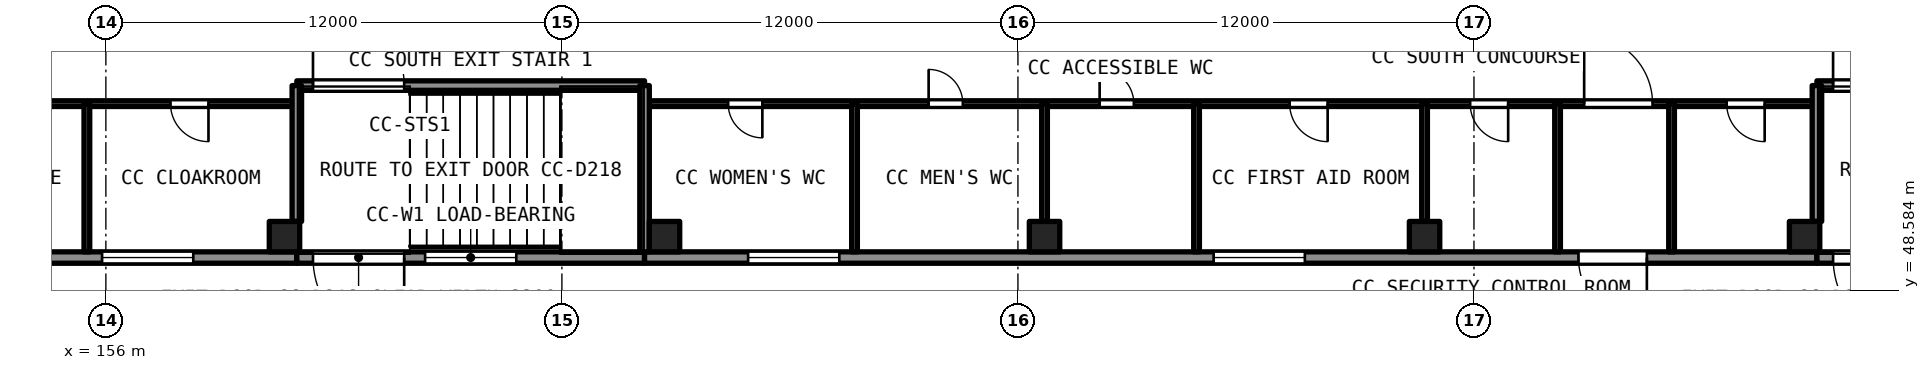
"""IFC4 building model, lengths in metres.
Left out: names, types, materials, properties, quantities, classifications, styles, units other than length and angle.
Written with IfcOpenShell. Run it as: python <this file> out.ifc"""

import sys

from ifc_helpers import new_model, si_unit, direction, frame, frame_2d, origin, origin_2d, place, context, subcontext, project, spatial, rectangle, extrude, element, fill, save


model = new_model("IFC4")
c1 = context("Model", 3, precision=1e-05, world=origin(), true_north=direction((0.0, 1.0)))
c2 = subcontext(c1, "Body", "Model", "MODEL_VIEW")
j1 = project(units=[si_unit("LENGTHUNIT", "METRE"), si_unit("PLANEANGLEUNIT", "RADIAN")], contexts=[c1])
p1 = place(None, origin())
s1 = spatial("IfcSite", under=j1, at=p1, CompositionType="ELEMENT")
p2 = place(p1, origin())
s2 = spatial("IfcBuilding", under=s1, at=p2, CompositionType="ELEMENT")
p3 = place(p2, origin())
s3 = spatial("IfcBuildingStorey", under=s2, at=p3, CompositionType="ELEMENT", Elevation=0.0)
for number, where, z_axis, x_axis in (
    (1, (160.7, 50.0, -1.2), (0.0, 0.0, 1.0), (1.0, 0.0, 0.0)),
    (2, (170.7, 50.0, -1.2), (0.0, 0.0, 1.0), (1.0, 0.0, 0.0)),
    (3, (180.7, 50.0, -1.2), (0.0, 0.0, 1.0), (1.0, 0.0, 0.0)),
    (4, (190.7, 50.0, -1.2), (0.0, 0.0, 1.0), (1.0, 0.0, 0.0)),
    (5, (200.7, 50.0, -1.2), (0.0, 0.0, 1.0), (1.0, 0.0, 0.0)),
):
    element("IfcColumn", number, at=place(p3, frame(where, z_axis=z_axis, x_axis=x_axis)), inside=s3, PredefinedType="COLUMN", context=c2, shape_type="SweptSolid", body=[
        extrude(rectangle(XDim=0.8, YDim=0.8, at=origin_2d()), origin(), (0.0, 0.0, 1.0), 10.2),
    ])
p4 = place(p3, frame((150.15, 49.45, 0.0), z_axis=(0.0, 0.0, 1.0), x_axis=(1.0, 0.0, 0.0)))
e6 = element("IfcWall", 6, at=p4, inside=s3, PredefinedType="SOLIDWALL", context=c2, shape_type="SweptSolid", body=[
    extrude(rectangle(XDim=10.875, YDim=0.3, at=frame_2d((5.438, 0.0))), origin(), (0.0, 0.0, 1.0), 8.59),
])
p5 = place(p4, frame((5.75, 0.0, 0.9)))
e7 = element("IfcOpeningElement", 7, at=p5, cuts=e6, PredefinedType="OPENING", context=c2, shape_type="SweptSolid", body=[
    extrude(rectangle(XDim=2.4, YDim=1.8, at=frame_2d((1.2, 0.9))), frame((0.0, 0.161, 0.0), z_axis=(0.0, -1.0, 0.0), x_axis=(1.0, 0.0, 0.0)), (0.0, 0.0, 1.0), 0.321),
])
p6 = place(p3, frame((170.175, 49.45, 0.0), z_axis=(0.0, 0.0, 1.0), x_axis=(-1.0, 0.0, 0.0)))
e8 = element("IfcWall", 8, at=p6, inside=s3, PredefinedType="SOLIDWALL", context=c2, shape_type="SweptSolid", body=[
    extrude(rectangle(XDim=9.15, YDim=0.3, at=frame_2d((4.575, 0.0))), origin(), (0.0, 0.0, 1.0), 8.59),
])
p7 = place(p6, frame((6.325, 0.0, 0.0)))
e9 = element("IfcOpeningElement", 9, at=p7, cuts=e8, PredefinedType="OPENING", context=c2, shape_type="SweptSolid", body=[
    extrude(rectangle(XDim=2.4, YDim=2.1, at=frame_2d((1.2, 1.05))), frame((0.0, 0.161, 0.0), z_axis=(0.0, -1.0, 0.0), x_axis=(1.0, 0.0, 0.0)), (0.0, 0.0, 1.0), 0.321),
])
p8 = place(p6, frame((3.375, 0.0, 0.9)))
e10 = element("IfcOpeningElement", 10, at=p8, cuts=e8, PredefinedType="OPENING", context=c2, shape_type="SweptSolid", body=[
    extrude(rectangle(XDim=2.4, YDim=1.8, at=frame_2d((1.2, 0.9))), frame((0.0, 0.161, 0.0), z_axis=(0.0, -1.0, 0.0), x_axis=(1.0, 0.0, 0.0)), (0.0, 0.0, 1.0), 0.321),
])
p9 = place(p3, frame((201.025, 49.45, 0.0), z_axis=(0.0, 0.0, 1.0), x_axis=(-1.0, 0.0, 0.0)))
e11 = element("IfcWall", 11, at=p9, inside=s3, PredefinedType="SOLIDWALL", context=c2, shape_type="SweptSolid", body=[
    extrude(rectangle(XDim=30.85, YDim=0.3, at=frame_2d((15.425, 0.0))), origin(), (0.0, 0.0, 1.0), 8.59),
])
p10 = place(p9, frame((4.475, 0.0, 0.0)))
e12 = element("IfcOpeningElement", 12, at=p10, cuts=e11, PredefinedType="OPENING", context=c2, shape_type="SweptSolid", body=[
    extrude(rectangle(XDim=1.8, YDim=2.1, at=frame_2d((0.9, 1.05))), frame((0.0, 0.161, 0.0), z_axis=(0.0, -1.0, 0.0), x_axis=(1.0, 0.0, 0.0)), (0.0, 0.0, 1.0), 0.321),
])
p11 = place(p9, frame((25.725, 0.0, 0.9)))
e13 = element("IfcOpeningElement", 13, at=p11, cuts=e11, PredefinedType="OPENING", context=c2, shape_type="SweptSolid", body=[
    extrude(rectangle(XDim=2.4, YDim=1.8, at=frame_2d((1.2, 0.9))), frame((0.0, 0.161, 0.0), z_axis=(0.0, -1.0, 0.0), x_axis=(1.0, 0.0, 0.0)), (0.0, 0.0, 1.0), 0.321),
])
p12 = place(p9, frame((13.475, 0.0, 0.9)))
e14 = element("IfcOpeningElement", 14, at=p12, cuts=e11, PredefinedType="OPENING", context=c2, shape_type="SweptSolid", body=[
    extrude(rectangle(XDim=2.4, YDim=1.8, at=frame_2d((1.2, 0.9))), frame((0.0, 0.161, 0.0), z_axis=(0.0, -1.0, 0.0), x_axis=(1.0, 0.0, 0.0)), (0.0, 0.0, 1.0), 0.321),
])
p13 = place(p3, frame((210.175, 49.45, 0.0), z_axis=(0.0, 0.0, 1.0), x_axis=(-1.0, 0.0, 0.0)))
e15 = element("IfcWall", 15, at=p13, inside=s3, PredefinedType="SOLIDWALL", context=c2, shape_type="SweptSolid", body=[
    extrude(rectangle(XDim=9.15, YDim=0.3, at=frame_2d((4.575, 0.0))), origin(), (0.0, 0.0, 1.0), 8.59),
])
p14 = place(p13, frame((6.325, 0.0, 0.0)))
e16 = element("IfcOpeningElement", 16, at=p14, cuts=e15, PredefinedType="OPENING", context=c2, shape_type="SweptSolid", body=[
    extrude(rectangle(XDim=2.4, YDim=2.1, at=frame_2d((1.2, 1.05))), frame((0.0, 0.161, 0.0), z_axis=(0.0, -1.0, 0.0), x_axis=(1.0, 0.0, 0.0)), (0.0, 0.0, 1.0), 0.321),
])
p15 = place(p13, frame((3.375, 0.0, 0.9)))
e17 = element("IfcOpeningElement", 17, at=p15, cuts=e15, PredefinedType="OPENING", context=c2, shape_type="SweptSolid", body=[
    extrude(rectangle(XDim=2.4, YDim=1.8, at=frame_2d((1.2, 0.9))), frame((0.0, 0.161, 0.0), z_axis=(0.0, -1.0, 0.0), x_axis=(1.0, 0.0, 0.0)), (0.0, 0.0, 1.0), 0.321),
])
p16 = place(p3, frame((150.3, 53.5, 0.0), z_axis=(0.0, 0.0, 1.0), x_axis=(1.0, 0.0, 0.0)))
e18 = element("IfcWall", 18, at=p16, inside=s3, PredefinedType="PARTITIONING", context=c2, shape_type="SweptSolid", body=[
    extrude(rectangle(XDim=10.725, YDim=0.15, at=frame_2d((5.362, 0.0))), origin(), (0.0, 0.0, 1.0), 8.59),
])
p17 = place(p16, frame((7.4, 0.0, 0.0)))
e19 = element("IfcOpeningElement", 19, at=p17, cuts=e18, PredefinedType="OPENING", context=c2, shape_type="SweptSolid", body=[
    extrude(rectangle(XDim=1.0, YDim=2.1, at=frame_2d((0.5, 1.05))), frame((0.0, 0.085, 0.0), z_axis=(0.0, -1.0, 0.0), x_axis=(1.0, 0.0, 0.0)), (0.0, 0.0, 1.0), 0.171),
])
p18 = place(p16, frame((2.05, 0.0, 0.0)))
e20 = element("IfcOpeningElement", 20, at=p18, cuts=e18, PredefinedType="OPENING", context=c2, shape_type="SweptSolid", body=[
    extrude(rectangle(XDim=1.0, YDim=2.1, at=frame_2d((0.5, 1.05))), frame((0.0, 0.085, 0.0), z_axis=(0.0, -1.0, 0.0), x_axis=(1.0, 0.0, 0.0)), (0.0, 0.0, 1.0), 0.171),
])
p19 = place(p3, frame((170.175, 53.5, 0.0), z_axis=(0.0, 0.0, 1.0), x_axis=(1.0, 0.0, 0.0)))
e21 = element("IfcWall", 21, at=p19, inside=s3, PredefinedType="PARTITIONING", context=c2, shape_type="SweptSolid", body=[
    extrude(rectangle(XDim=30.85, YDim=0.15, at=frame_2d((15.425, 0.0))), origin(), (0.0, 0.0, 1.0), 8.59),
])
p20 = place(p19, frame((11.975, 0.0, 0.0)))
e22 = element("IfcOpeningElement", 22, at=p20, cuts=e21, PredefinedType="OPENING", context=c2, shape_type="SweptSolid", body=[
    extrude(rectangle(XDim=0.9, YDim=2.1, at=frame_2d((0.45, 1.05))), frame((0.0, 0.085, 0.0), z_axis=(0.0, -1.0, 0.0), x_axis=(1.0, 0.0, 0.0)), (0.0, 0.0, 1.0), 0.171),
])
p21 = place(p19, frame((28.475, 0.0, 0.0)))
e23 = element("IfcOpeningElement", 23, at=p21, cuts=e21, PredefinedType="OPENING", context=c2, shape_type="SweptSolid", body=[
    extrude(rectangle(XDim=1.0, YDim=2.1, at=frame_2d((0.5, 1.05))), frame((0.0, 0.085, 0.0), z_axis=(0.0, -1.0, 0.0), x_axis=(1.0, 0.0, 0.0)), (0.0, 0.0, 1.0), 0.171),
])
p22 = place(p19, frame((16.975, 0.0, 0.0)))
e24 = element("IfcOpeningElement", 24, at=p22, cuts=e21, PredefinedType="OPENING", context=c2, shape_type="SweptSolid", body=[
    extrude(rectangle(XDim=1.0, YDim=2.1, at=frame_2d((0.5, 1.05))), frame((0.0, 0.085, 0.0), z_axis=(0.0, -1.0, 0.0), x_axis=(1.0, 0.0, 0.0)), (0.0, 0.0, 1.0), 0.171),
])
p23 = place(p19, frame((24.725, 0.0, 0.0)))
e25 = element("IfcOpeningElement", 25, at=p23, cuts=e21, PredefinedType="OPENING", context=c2, shape_type="SweptSolid", body=[
    extrude(rectangle(XDim=1.8, YDim=2.1, at=frame_2d((0.9, 1.05))), frame((0.0, 0.085, 0.0), z_axis=(0.0, -1.0, 0.0), x_axis=(1.0, 0.0, 0.0)), (0.0, 0.0, 1.0), 0.171),
])
p24 = place(p19, frame((7.475, 0.0, 0.0)))
e26 = element("IfcOpeningElement", 26, at=p24, cuts=e21, PredefinedType="OPENING", context=c2, shape_type="SweptSolid", body=[
    extrude(rectangle(XDim=0.9, YDim=2.1, at=frame_2d((0.45, 1.05))), frame((0.0, 0.085, 0.0), z_axis=(0.0, -1.0, 0.0), x_axis=(1.0, 0.0, 0.0)), (0.0, 0.0, 1.0), 0.171),
])
p25 = place(p19, frame((21.725, 0.0, 0.0)))
e27 = element("IfcOpeningElement", 27, at=p25, cuts=e21, PredefinedType="OPENING", context=c2, shape_type="SweptSolid", body=[
    extrude(rectangle(XDim=1.0, YDim=2.1, at=frame_2d((0.5, 1.05))), frame((0.0, 0.085, 0.0), z_axis=(0.0, -1.0, 0.0), x_axis=(1.0, 0.0, 0.0)), (0.0, 0.0, 1.0), 0.171),
])
p26 = place(p19, frame((2.2, 0.0, 0.0)))
e28 = element("IfcOpeningElement", 28, at=p26, cuts=e21, PredefinedType="OPENING", context=c2, shape_type="SweptSolid", body=[
    extrude(rectangle(XDim=0.9, YDim=2.1, at=frame_2d((0.45, 1.05))), frame((0.0, 0.085, 0.0), z_axis=(0.0, -1.0, 0.0), x_axis=(1.0, 0.0, 0.0)), (0.0, 0.0, 1.0), 0.171),
])
p27 = place(p3, frame((161.025, 53.975, 0.0), z_axis=(0.0, 0.0, 1.0), x_axis=(1.0, 0.0, 0.0)))
e29 = element("IfcWall", 29, at=p27, inside=s3, PredefinedType="SHEAR", context=c2, shape_type="SweptSolid", body=[
    extrude(rectangle(XDim=9.15, YDim=0.25, at=frame_2d((4.575, 0.0))), origin(), (0.0, 0.0, 1.0), 8.59),
])
p28 = place(p27, frame((0.425, 0.0, 0.0)))
e30 = element("IfcOpeningElement", 30, at=p28, cuts=e29, PredefinedType="OPENING", context=c2, shape_type="SweptSolid", body=[
    extrude(rectangle(XDim=2.4, YDim=2.1, at=frame_2d((1.2, 1.05))), frame((0.0, 0.135, 0.0), z_axis=(0.0, -1.0, 0.0), x_axis=(1.0, 0.0, 0.0)), (0.0, 0.0, 1.0), 0.271),
])
p29 = place(p3, frame((161.025, 50.4, 0.0), z_axis=(0.0, 0.0, 1.0), x_axis=(0.0, 1.0, 0.0)))
e31 = element("IfcWall", 31, at=p29, inside=s3, PredefinedType="SHEAR", context=c2, shape_type="SweptSolid", body=[
    extrude(rectangle(XDim=3.575, YDim=0.25, at=frame_2d((1.788, 0.0))), origin(), (0.0, 0.0, 1.0), 8.59),
])
p30 = place(p3, frame((170.175, 49.6, 0.0), z_axis=(0.0, 0.0, 1.0), x_axis=(0.0, 1.0, 0.0)))
e32 = element("IfcWall", 32, at=p30, inside=s3, PredefinedType="SHEAR", context=c2, shape_type="SweptSolid", body=[
    extrude(rectangle(XDim=4.375, YDim=0.25, at=frame_2d((2.188, 0.0))), origin(), (0.0, 0.0, 1.0), 8.59),
])
p31 = place(p3, frame((201.025, 53.975, 0.0), z_axis=(0.0, 0.0, 1.0), x_axis=(1.0, 0.0, 0.0)))
e33 = element("IfcWall", 33, at=p31, inside=s3, PredefinedType="SHEAR", context=c2, shape_type="SweptSolid", body=[
    extrude(rectangle(XDim=9.15, YDim=0.25, at=frame_2d((4.575, 0.0))), origin(), (0.0, 0.0, 1.0), 8.59),
])
p32 = place(p31, frame((0.425, 0.0, 0.0)))
e34 = element("IfcOpeningElement", 34, at=p32, cuts=e33, PredefinedType="OPENING", context=c2, shape_type="SweptSolid", body=[
    extrude(rectangle(XDim=2.4, YDim=2.1, at=frame_2d((1.2, 1.05))), frame((0.0, 0.135, 0.0), z_axis=(0.0, -1.0, 0.0), x_axis=(1.0, 0.0, 0.0)), (0.0, 0.0, 1.0), 0.271),
])
p33 = place(p3, frame((201.025, 50.4, 0.0), z_axis=(0.0, 0.0, 1.0), x_axis=(0.0, 1.0, 0.0)))
e35 = element("IfcWall", 35, at=p33, inside=s3, PredefinedType="SHEAR", context=c2, shape_type="SweptSolid", body=[
    extrude(rectangle(XDim=3.575, YDim=0.25, at=frame_2d((1.788, 0.0))), origin(), (0.0, 0.0, 1.0), 8.59),
])
for number, where, z_axis, x_axis in (
    (36, (155.5, 49.6, 0.0), (0.0, 0.0, 1.0), (0.0, 1.0, 0.0)),
    (37, (175.7, 49.6, 0.0), (0.0, 0.0, 1.0), (0.0, 1.0, 0.0)),
):
    element("IfcWall", number, at=place(p3, frame(where, z_axis=z_axis, x_axis=x_axis)), inside=s3, PredefinedType="PARTITIONING", context=c2, shape_type="SweptSolid", body=[
        extrude(rectangle(XDim=3.9, YDim=0.15, at=frame_2d((1.95, 0.0))), origin(), (0.0, 0.0, 1.0), 8.59),
    ])
p34 = place(p3, frame((180.7, 50.4, 0.0), z_axis=(0.0, 0.0, 1.0), x_axis=(0.0, 1.0, 0.0)))
e38 = element("IfcWall", 38, at=p34, inside=s3, PredefinedType="PARTITIONING", context=c2, shape_type="SweptSolid", body=[
    extrude(rectangle(XDim=3.1, YDim=0.15, at=frame_2d((1.55, 0.0))), origin(), (0.0, 0.0, 1.0), 8.59),
])
p35 = place(p3, frame((184.7, 49.6, 0.0), z_axis=(0.0, 0.0, 1.0), x_axis=(0.0, 1.0, 0.0)))
e39 = element("IfcWall", 39, at=p35, inside=s3, PredefinedType="PARTITIONING", context=c2, shape_type="SweptSolid", body=[
    extrude(rectangle(XDim=3.9, YDim=0.15, at=frame_2d((1.95, 0.0))), origin(), (0.0, 0.0, 1.0), 8.59),
])
p36 = place(p3, frame((190.7, 50.4, 0.0), z_axis=(0.0, 0.0, 1.0), x_axis=(0.0, 1.0, 0.0)))
e40 = element("IfcWall", 40, at=p36, inside=s3, PredefinedType="PARTITIONING", context=c2, shape_type="SweptSolid", body=[
    extrude(rectangle(XDim=3.1, YDim=0.15, at=frame_2d((1.55, 0.0))), origin(), (0.0, 0.0, 1.0), 8.59),
])
for number, where, z_axis, x_axis in (
    (41, (194.2, 49.6, 0.0), (0.0, 0.0, 1.0), (0.0, 1.0, 0.0)),
    (42, (197.2, 49.6, 0.0), (0.0, 0.0, 1.0), (0.0, 1.0, 0.0)),
):
    element("IfcWall", number, at=place(p3, frame(where, z_axis=z_axis, x_axis=x_axis)), inside=s3, PredefinedType="PARTITIONING", context=c2, shape_type="SweptSolid", body=[
        extrude(rectangle(XDim=3.9, YDim=0.15, at=frame_2d((1.95, 0.0))), origin(), (0.0, 0.0, 1.0), 8.59),
    ])
p37 = place(p20, origin())
e43 = element("IfcDoor", 43, at=p37, inside=s3, OperationType="SINGLE_SWING_LEFT", PredefinedType="DOOR", context=c2, shape_type="SweptSolid", body=[
    extrude(rectangle(XDim=0.9, YDim=2.1, at=frame_2d((0.45, 1.05))), frame((0.0, 0.025, 0.0), z_axis=(0.0, -1.0, 0.0), x_axis=(1.0, 0.0, 0.0)), (0.0, 0.0, 1.0), 0.05),
])
fill(e22, e43)
p38 = place(p17, origin())
e44 = element("IfcDoor", 44, at=p38, inside=s3, OperationType="SINGLE_SWING_RIGHT", PredefinedType="DOOR", context=c2, shape_type="SweptSolid", body=[
    extrude(rectangle(XDim=1.0, YDim=2.1, at=frame_2d((0.5, 1.05))), frame((0.0, 0.025, 0.0), z_axis=(0.0, -1.0, 0.0), x_axis=(1.0, 0.0, 0.0)), (0.0, 0.0, 1.0), 0.05),
])
fill(e19, e44)
p39 = place(p21, origin())
e45 = element("IfcDoor", 45, at=p39, inside=s3, OperationType="SINGLE_SWING_RIGHT", PredefinedType="DOOR", context=c2, shape_type="SweptSolid", body=[
    extrude(rectangle(XDim=1.0, YDim=2.1, at=frame_2d((0.5, 1.05))), frame((0.0, 0.025, 0.0), z_axis=(0.0, -1.0, 0.0), x_axis=(1.0, 0.0, 0.0)), (0.0, 0.0, 1.0), 0.05),
])
fill(e23, e45)
p40 = place(p22, origin())
e46 = element("IfcDoor", 46, at=p40, inside=s3, OperationType="SINGLE_SWING_RIGHT", PredefinedType="DOOR", context=c2, shape_type="SweptSolid", body=[
    extrude(rectangle(XDim=1.0, YDim=2.1, at=frame_2d((0.5, 1.05))), frame((0.0, 0.025, 0.0), z_axis=(0.0, -1.0, 0.0), x_axis=(1.0, 0.0, 0.0)), (0.0, 0.0, 1.0), 0.05),
])
fill(e24, e46)
p41 = place(p23, origin())
e47 = element("IfcDoor", 47, at=p41, inside=s3, OperationType="DOUBLE_DOOR_SINGLE_SWING", PredefinedType="DOOR", context=c2, shape_type="SweptSolid", body=[
    extrude(rectangle(XDim=1.8, YDim=2.1, at=frame_2d((0.9, 1.05))), frame((0.0, 0.025, 0.0), z_axis=(0.0, -1.0, 0.0), x_axis=(1.0, 0.0, 0.0)), (0.0, 0.0, 1.0), 0.05),
])
fill(e25, e47)
p42 = place(p24, origin())
e48 = element("IfcDoor", 48, at=p42, inside=s3, OperationType="SINGLE_SWING_LEFT", PredefinedType="DOOR", context=c2, shape_type="SweptSolid", body=[
    extrude(rectangle(XDim=0.9, YDim=2.1, at=frame_2d((0.45, 1.05))), frame((0.0, 0.025, 0.0), z_axis=(0.0, -1.0, 0.0), x_axis=(1.0, 0.0, 0.0)), (0.0, 0.0, 1.0), 0.05),
])
fill(e26, e48)
p43 = place(p25, origin())
e49 = element("IfcDoor", 49, at=p43, inside=s3, OperationType="SINGLE_SWING_RIGHT", PredefinedType="DOOR", context=c2, shape_type="SweptSolid", body=[
    extrude(rectangle(XDim=1.0, YDim=2.1, at=frame_2d((0.5, 1.05))), frame((0.0, 0.025, 0.0), z_axis=(0.0, -1.0, 0.0), x_axis=(1.0, 0.0, 0.0)), (0.0, 0.0, 1.0), 0.05),
])
fill(e27, e49)
p44 = place(p26, origin())
e50 = element("IfcDoor", 50, at=p44, inside=s3, OperationType="SINGLE_SWING_RIGHT", PredefinedType="DOOR", context=c2, shape_type="SweptSolid", body=[
    extrude(rectangle(XDim=0.9, YDim=2.1, at=frame_2d((0.45, 1.05))), frame((0.0, 0.025, 0.0), z_axis=(0.0, -1.0, 0.0), x_axis=(1.0, 0.0, 0.0)), (0.0, 0.0, 1.0), 0.05),
])
fill(e28, e50)
p45 = place(p10, origin())
e51 = element("IfcDoor", 51, at=p45, inside=s3, OperationType="DOUBLE_DOOR_SINGLE_SWING", PredefinedType="DOOR", context=c2, shape_type="SweptSolid", body=[
    extrude(rectangle(XDim=1.8, YDim=2.1, at=frame_2d((0.9, 1.05))), frame((0.0, 0.025, 0.0), z_axis=(0.0, -1.0, 0.0), x_axis=(1.0, 0.0, 0.0)), (0.0, 0.0, 1.0), 0.05),
])
fill(e12, e51)
p46 = place(p28, origin())
e52 = element("IfcDoor", 52, at=p46, inside=s3, OperationType="DOUBLE_DOOR_SINGLE_SWING", PredefinedType="DOOR", context=c2, shape_type="SweptSolid", body=[
    extrude(rectangle(XDim=2.4, YDim=2.1, at=frame_2d((1.2, 1.05))), frame((0.0, 0.025, 0.0), z_axis=(0.0, -1.0, 0.0), x_axis=(1.0, 0.0, 0.0)), (0.0, 0.0, 1.0), 0.05),
])
fill(e30, e52)
p47 = place(p7, origin())
e53 = element("IfcDoor", 53, at=p47, inside=s3, OperationType="DOUBLE_DOOR_SINGLE_SWING", PredefinedType="DOOR", context=c2, shape_type="SweptSolid", body=[
    extrude(rectangle(XDim=2.4, YDim=2.1, at=frame_2d((1.2, 1.05))), frame((0.0, 0.025, 0.0), z_axis=(0.0, -1.0, 0.0), x_axis=(1.0, 0.0, 0.0)), (0.0, 0.0, 1.0), 0.05),
])
fill(e9, e53)
p48 = place(p32, origin())
e54 = element("IfcDoor", 54, at=p48, inside=s3, OperationType="DOUBLE_DOOR_SINGLE_SWING", PredefinedType="DOOR", context=c2, shape_type="SweptSolid", body=[
    extrude(rectangle(XDim=2.4, YDim=2.1, at=frame_2d((1.2, 1.05))), frame((0.0, 0.025, 0.0), z_axis=(0.0, -1.0, 0.0), x_axis=(1.0, 0.0, 0.0)), (0.0, 0.0, 1.0), 0.05),
])
fill(e34, e54)
p49 = place(p14, origin())
e55 = element("IfcDoor", 55, at=p49, inside=s3, OperationType="DOUBLE_DOOR_SINGLE_SWING", PredefinedType="DOOR", context=c2, shape_type="SweptSolid", body=[
    extrude(rectangle(XDim=2.4, YDim=2.1, at=frame_2d((1.2, 1.05))), frame((0.0, 0.025, 0.0), z_axis=(0.0, -1.0, 0.0), x_axis=(1.0, 0.0, 0.0)), (0.0, 0.0, 1.0), 0.05),
])
fill(e16, e55)
p50 = place(p5, origin())
e56 = element("IfcWindow", 56, at=p50, inside=s3, PartitioningType="DOUBLE_PANEL_VERTICAL", PredefinedType="WINDOW", context=c2, shape_type="SweptSolid", body=[
    extrude(rectangle(XDim=2.4, YDim=1.8, at=frame_2d((1.2, 0.9))), frame((0.0, 0.03, 0.0), z_axis=(0.0, -1.0, 0.0), x_axis=(1.0, 0.0, 0.0)), (0.0, 0.0, 1.0), 0.06),
])
fill(e7, e56)
p51 = place(p8, origin())
e57 = element("IfcWindow", 57, at=p51, inside=s3, PartitioningType="DOUBLE_PANEL_VERTICAL", PredefinedType="WINDOW", context=c2, shape_type="SweptSolid", body=[
    extrude(rectangle(XDim=2.4, YDim=1.8, at=frame_2d((1.2, 0.9))), frame((0.0, 0.03, 0.0), z_axis=(0.0, -1.0, 0.0), x_axis=(1.0, 0.0, 0.0)), (0.0, 0.0, 1.0), 0.06),
])
fill(e10, e57)
p52 = place(p11, origin())
e58 = element("IfcWindow", 58, at=p52, inside=s3, PartitioningType="DOUBLE_PANEL_VERTICAL", PredefinedType="WINDOW", context=c2, shape_type="SweptSolid", body=[
    extrude(rectangle(XDim=2.4, YDim=1.8, at=frame_2d((1.2, 0.9))), frame((0.0, 0.03, 0.0), z_axis=(0.0, -1.0, 0.0), x_axis=(1.0, 0.0, 0.0)), (0.0, 0.0, 1.0), 0.06),
])
fill(e13, e58)
p53 = place(p12, origin())
e59 = element("IfcWindow", 59, at=p53, inside=s3, PartitioningType="DOUBLE_PANEL_VERTICAL", PredefinedType="WINDOW", context=c2, shape_type="SweptSolid", body=[
    extrude(rectangle(XDim=2.4, YDim=1.8, at=frame_2d((1.2, 0.9))), frame((0.0, 0.03, 0.0), z_axis=(0.0, -1.0, 0.0), x_axis=(1.0, 0.0, 0.0)), (0.0, 0.0, 1.0), 0.06),
])
fill(e14, e59)
save(model, sys.argv[1])
